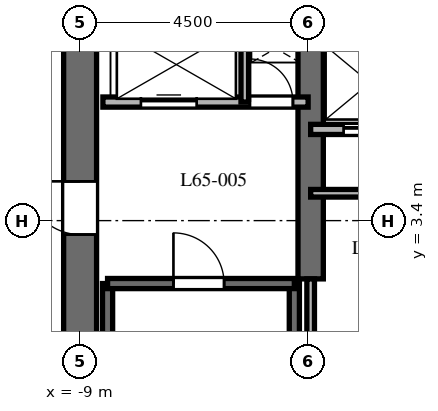
"""IFC4 building model, lengths in metres.
Left out: names, types, materials, properties, quantities, classifications, styles, units other than length and angle.
Written with IfcOpenShell. Run it as: python <this file> out.ifc"""

import sys

from ifc_helpers import new_model, si_unit, direction, frame, frame_2d, origin, place, context, subcontext, project, spatial, rectangle, extrude, element, fill, save


model = new_model("IFC4")
c1 = context("Model", 3, precision=1e-05, world=origin(), true_north=direction((0.0, 1.0)))
c2 = subcontext(c1, "Body", "Model", "MODEL_VIEW")
j1 = project(units=[si_unit("LENGTHUNIT", "METRE"), si_unit("PLANEANGLEUNIT", "RADIAN")], contexts=[c1])
p1 = place(None, origin())
s1 = spatial("IfcSite", under=j1, at=p1, CompositionType="ELEMENT")
p2 = place(p1, origin())
s2 = spatial("IfcBuilding", under=s1, at=p2, CompositionType="ELEMENT")
p3 = place(p2, frame((0.0, 0.0, 261.3)))
s3 = spatial("IfcBuildingStorey", under=s2, at=p3, CompositionType="ELEMENT", Elevation=261.3)
p4 = place(p3, frame((-9.0, -7.175, 0.0), z_axis=(0.0, 0.0, 1.0), x_axis=(0.0, 1.0, 0.0)))
e1 = element("IfcWall", 1, at=p4, inside=s3, PredefinedType="SHEAR", context=c2, shape_type="SweptSolid", body=[
    extrude(rectangle(XDim=14.35, YDim=0.65, at=frame_2d((7.175, 0.0))), origin(), (0.0, 0.0, 1.0), 3.9),
])
p5 = place(p4, frame((10.3, 0.0, 0.0)))
e2 = element("IfcOpeningElement", 2, at=p5, cuts=e1, PredefinedType="OPENING", context=c2, shape_type="SweptSolid", body=[
    extrude(rectangle(XDim=1.05, YDim=2.15, at=frame_2d((0.525, 1.075))), frame((0.0, 0.335, 0.0), z_axis=(0.0, -1.0, 0.0), x_axis=(1.0, 0.0, 0.0)), (0.0, 0.0, 1.0), 0.67),
])
p6 = place(p3, frame((-4.45, 2.25, 0.0), z_axis=(0.0, 0.0, 1.0), x_axis=(0.0, 1.0, 0.0)))
e3 = element("IfcWall", 3, at=p6, inside=s3, PredefinedType="SHEAR", context=c2, shape_type="SweptSolid", body=[
    extrude(rectangle(XDim=4.925, YDim=0.5, at=frame_2d((2.462, 0.0))), origin(), (0.0, 0.0, 1.0), 3.9),
])
for number, where, z_axis, x_axis in (
    (4, (-8.458, -6.985, 0.0), (0.0, 0.0, 1.0), (0.0, 1.0, 0.0)),
    (5, (-4.772, -6.985, 0.0), (0.0, 0.0, 1.0), (0.0, 1.0, 0.0)),
):
    element("IfcWall", number, at=place(p3, frame(where, z_axis=z_axis, x_axis=x_axis)), inside=s3, PredefinedType="SHEAR", context=c2, shape_type="SweptSolid", body=[
        extrude(rectangle(XDim=9.143, YDim=0.2, at=frame_2d((4.572, 0.0))), origin(), (0.0, 0.0, 1.0), 3.9),
    ])
p7 = place(p3, frame((-8.458, 2.158, 0.0), z_axis=(0.0, 0.0, 1.0), x_axis=(1.0, 0.0, 0.0)))
e6 = element("IfcWall", 6, at=p7, inside=s3, PredefinedType="SHEAR", context=c2, shape_type="SweptSolid", body=[
    extrude(rectangle(XDim=3.686, YDim=0.2, at=frame_2d((1.843, 0.0))), origin(), (0.0, 0.0, 1.0), 3.9),
])
p8 = place(p7, frame((1.3, 0.0, 0.0)))
e7 = element("IfcOpeningElement", 7, at=p8, cuts=e6, PredefinedType="OPENING", context=c2, shape_type="SweptSolid", body=[
    extrude(rectangle(XDim=1.0, YDim=2.15, at=frame_2d((0.5, 1.075))), frame((0.0, 0.11, 0.0), z_axis=(0.0, -1.0, 0.0), x_axis=(1.0, 0.0, 0.0)), (0.0, 0.0, 1.0), 0.22),
])
p9 = place(p3, frame((-8.55, 5.74, 0.0), z_axis=(0.0, 0.0, 1.0), x_axis=(1.0, 0.0, 0.0)))
e8 = element("IfcWall", 8, at=p9, inside=s3, PredefinedType="PARTITIONING", context=c2, shape_type="SweptSolid", body=[
    extrude(rectangle(XDim=4.05, YDim=0.2, at=frame_2d((2.025, 0.0))), origin(), (0.0, 0.0, 1.0), 3.6),
])
p10 = place(p9, frame((0.75, 0.0, 0.0)))
e9 = element("IfcOpeningElement", 9, at=p10, cuts=e8, PredefinedType="OPENING", context=c2, shape_type="SweptSolid", body=[
    extrude(rectangle(XDim=1.1, YDim=2.2, at=frame_2d((0.55, 1.1))), frame((0.0, 0.11, 0.0), z_axis=(0.0, -1.0, 0.0), x_axis=(1.0, 0.0, 0.0)), (0.0, 0.0, 1.0), 0.22),
])
p11 = place(p9, frame((2.9, 0.0, 0.0)))
e10 = element("IfcOpeningElement", 10, at=p11, cuts=e8, PredefinedType="OPENING", context=c2, shape_type="SweptSolid", body=[
    extrude(rectangle(XDim=0.85, YDim=2.03, at=frame_2d((0.425, 1.015))), frame((0.0, 0.11, 0.0), z_axis=(0.0, -1.0, 0.0), x_axis=(1.0, 0.0, 0.0)), (0.0, 0.0, 1.0), 0.22),
])
p12 = place(p3, frame((-5.75, 5.74, 0.0), z_axis=(0.0, 0.0, 1.0), x_axis=(0.0, 1.0, 0.0)))
e11 = element("IfcWall", 11, at=p12, inside=s3, PredefinedType="PARTITIONING", context=c2, shape_type="SweptSolid", body=[
    extrude(rectangle(XDim=1.41, YDim=0.15, at=frame_2d((0.705, 0.0))), origin(), (0.0, 0.0, 1.0), 3.6),
])
p13 = place(p3, frame((-4.45, 5.2, 0.0), z_axis=(0.0, 0.0, 1.0), x_axis=(1.0, 0.0, 0.0)))
e12 = element("IfcWall", 12, at=p13, inside=s3, PredefinedType="PARTITIONING", context=c2, shape_type="SweptSolid", body=[
    extrude(rectangle(XDim=4.5, YDim=0.2, at=frame_2d((2.25, 0.0))), origin(), (0.0, 0.0, 1.0), 3.6),
])
p14 = place(p13, frame((0.65, 0.0, 0.0)))
e13 = element("IfcOpeningElement", 13, at=p14, cuts=e12, PredefinedType="OPENING", context=c2, shape_type="SweptSolid", body=[
    extrude(rectangle(XDim=1.0, YDim=2.2, at=frame_2d((0.5, 1.1))), frame((0.0, 0.11, 0.0), z_axis=(0.0, -1.0, 0.0), x_axis=(1.0, 0.0, 0.0)), (0.0, 0.0, 1.0), 0.22),
])
p15 = place(p13, frame((2.85, 0.0, 0.0)))
e14 = element("IfcOpeningElement", 14, at=p15, cuts=e12, PredefinedType="OPENING", context=c2, shape_type="SweptSolid", body=[
    extrude(rectangle(XDim=1.0, YDim=2.2, at=frame_2d((0.5, 1.1))), frame((0.0, 0.11, 0.0), z_axis=(0.0, -1.0, 0.0), x_axis=(1.0, 0.0, 0.0)), (0.0, 0.0, 1.0), 0.22),
])
p16 = place(p3, frame((-4.45, -0.5, 0.0), z_axis=(0.0, 0.0, 1.0), x_axis=(0.0, 1.0, 0.0)))
e15 = element("IfcWall", 15, at=p16, inside=s3, PredefinedType="PARTITIONING", context=c2, shape_type="SweptSolid", body=[
    extrude(rectangle(XDim=2.75, YDim=0.15, at=frame_2d((1.375, 0.0))), origin(), (0.0, 0.0, 1.0), 3.6),
])
p17 = place(p3, frame((-4.45, 3.94, 0.0), z_axis=(0.0, 0.0, 1.0), x_axis=(1.0, 0.0, 0.0)))
e16 = element("IfcWall", 16, at=p17, inside=s3, PredefinedType="PARTITIONING", context=c2, shape_type="SweptSolid", body=[
    extrude(rectangle(XDim=2.55, YDim=0.15, at=frame_2d((1.275, 0.0))), origin(), (0.0, 0.0, 1.0), 3.6),
])
p18 = place(p8, origin())
e17 = element("IfcDoor", 17, at=p18, inside=s3, OperationType="SINGLE_SWING_LEFT", PredefinedType="DOOR", context=c2, shape_type="SweptSolid", body=[
    extrude(rectangle(XDim=1.0, YDim=2.15, at=frame_2d((0.5, 1.075))), frame((0.0, 0.025, 0.0), z_axis=(0.0, -1.0, 0.0), x_axis=(1.0, 0.0, 0.0)), (0.0, 0.0, 1.0), 0.05),
])
fill(e7, e17)
p19 = place(p5, origin())
e18 = element("IfcDoor", 18, at=p19, inside=s3, OperationType="SINGLE_SWING_RIGHT", PredefinedType="DOOR", context=c2, shape_type="SweptSolid", body=[
    extrude(rectangle(XDim=1.05, YDim=2.15, at=frame_2d((0.525, 1.075))), frame((0.0, 0.025, 0.0), z_axis=(0.0, -1.0, 0.0), x_axis=(1.0, 0.0, 0.0)), (0.0, 0.0, 1.0), 0.05),
])
fill(e2, e18)
p20 = place(p10, origin())
e19 = element("IfcDoor", 19, at=p20, inside=s3, OperationType="SLIDING_TO_LEFT", PredefinedType="DOOR", context=c2, shape_type="SweptSolid", body=[
    extrude(rectangle(XDim=1.1, YDim=2.2, at=frame_2d((0.55, 1.1))), frame((0.0, 0.025, 0.0), z_axis=(0.0, -1.0, 0.0), x_axis=(1.0, 0.0, 0.0)), (0.0, 0.0, 1.0), 0.05),
])
fill(e9, e19)
p21 = place(p11, origin())
e20 = element("IfcDoor", 20, at=p21, inside=s3, OperationType="SINGLE_SWING_LEFT", PredefinedType="DOOR", context=c2, shape_type="SweptSolid", body=[
    extrude(rectangle(XDim=0.85, YDim=2.03, at=frame_2d((0.425, 1.015))), frame((0.0, 0.025, 0.0), z_axis=(0.0, -1.0, 0.0), x_axis=(1.0, 0.0, 0.0)), (0.0, 0.0, 1.0), 0.05),
])
fill(e10, e20)
p22 = place(p14, origin())
e21 = element("IfcDoor", 21, at=p22, inside=s3, OperationType="SLIDING_TO_LEFT", PredefinedType="DOOR", context=c2, shape_type="SweptSolid", body=[
    extrude(rectangle(XDim=1.0, YDim=2.2, at=frame_2d((0.5, 1.1))), frame((0.0, 0.025, 0.0), z_axis=(0.0, -1.0, 0.0), x_axis=(1.0, 0.0, 0.0)), (0.0, 0.0, 1.0), 0.05),
])
fill(e13, e21)
save(model, sys.argv[1])
